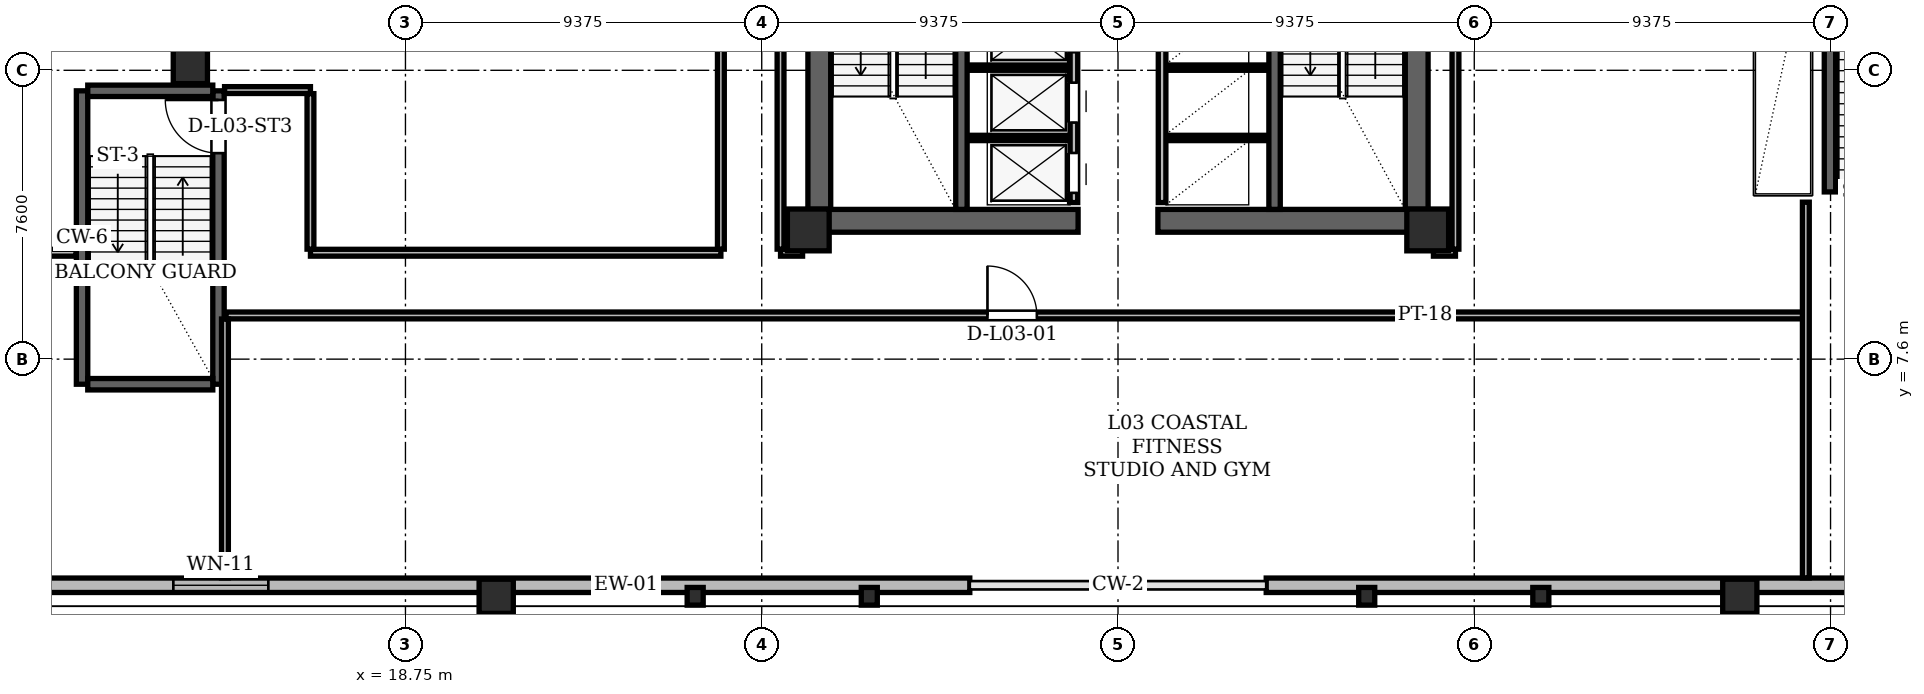
"""IFC4 building model, lengths in metres.
Left out: names, types, materials, properties, quantities, classifications, styles, units other than length and angle.
Written with IfcOpenShell. Run it as: python <this file> out.ifc"""

import sys

from ifc_helpers import new_model, si_unit, direction, frame, frame_2d, origin, origin_2d, place, context, subcontext, project, spatial, rectangle, hollow_rectangle, i_section, extrude, element, fill, save


model = new_model("IFC4")
c1 = context("Model", 3, precision=1e-05, world=origin(), true_north=direction((0.0, 1.0)))
c2 = subcontext(c1, "Body", "Model", "MODEL_VIEW")
j1 = project(units=[si_unit("LENGTHUNIT", "METRE"), si_unit("PLANEANGLEUNIT", "RADIAN")], contexts=[c1])
p1 = place(None, origin())
s1 = spatial("IfcSite", under=j1, at=p1, CompositionType="ELEMENT")
p2 = place(p1, origin())
s2 = spatial("IfcBuilding", under=s1, at=p2, CompositionType="ELEMENT")
p3 = place(p2, frame((0.0, 0.0, 14.1)))
s3 = spatial("IfcBuildingStorey", under=s2, at=p3, CompositionType="ELEMENT", Elevation=14.1)
for number, where, z_axis, x_axis in (
    (1, (29.35, 11.0, 0.0), (0.0, 0.0, 1.0), (1.0, 0.0, 0.0)),
    (2, (45.65, 11.0, 0.0), (0.0, 0.0, 1.0), (1.0, 0.0, 0.0)),
):
    element("IfcColumn", number, at=place(p3, frame(where, z_axis=z_axis, x_axis=x_axis)), inside=s3, PredefinedType="COLUMN", context=c2, shape_type="SweptSolid", body=[
        extrude(hollow_rectangle(XDim=1.1, YDim=1.1, WallThickness=0.09, at=origin_2d()), origin(), (0.0, 0.0, 1.0), 4.2),
    ])
for number, where, z_axis, x_axis in (
    (3, (13.09, 15.3, 0.004), (0.0, 0.0, 1.0), (1.0, 0.0, 0.0)),
    (4, (21.138, 1.36, 0.004), (0.0, 0.0, 1.0), (1.0, 0.0, 0.0)),
    (5, (53.862, 1.36, 0.004), (0.0, 0.0, 1.0), (1.0, 0.0, 0.0)),
):
    element("IfcColumn", number, at=place(p3, frame(where, z_axis=z_axis, x_axis=x_axis)), inside=s3, PredefinedType="COLUMN", context=c2, shape_type="SweptSolid", body=[
        extrude(hollow_rectangle(XDim=0.9, YDim=0.9, WallThickness=0.075, at=origin_2d()), origin(), (0.0, 0.0, 1.0), 4.191),
    ])
for number, where, z_axis, x_axis in (
    (6, (26.374, 1.36, 0.004), (0.0, 0.0, 1.0), (1.0, 0.0, 0.0)),
    (7, (30.955, 1.36, 0.004), (0.0, 0.0, 1.0), (1.0, 0.0, 0.0)),
    (8, (44.045, 1.36, 0.004), (0.0, 0.0, 1.0), (1.0, 0.0, 0.0)),
    (9, (48.626, 1.36, 0.004), (0.0, 0.0, 1.0), (1.0, 0.0, 0.0)),
):
    element("IfcColumn", number, at=place(p3, frame(where, z_axis=z_axis, x_axis=x_axis)), inside=s3, PredefinedType="COLUMN", context=c2, shape_type="SweptSolid", body=[
        extrude(i_section(OverallWidth=0.422, OverallDepth=0.465, WebThickness=0.045, FlangeThickness=0.072, at=origin_2d()), origin(), (0.0, 0.0, 1.0), 4.191),
    ])
for number, where, z_axis, x_axis in (
    (10, (29.64, 11.0, 0.0), (0.0, 0.0, 1.0), (0.0, 1.0, 0.0)),
    (11, (45.36, 11.0, 0.0), (0.0, 0.0, 1.0), (0.0, 1.0, 0.0)),
):
    element("IfcWall", number, at=place(p3, frame(where, z_axis=z_axis, x_axis=x_axis)), inside=s3, PredefinedType="SHEAR", context=c2, shape_type="SweptSolid", body=[
        extrude(rectangle(XDim=13.3, YDim=0.6, at=frame_2d((6.65, 0.0))), origin(), (0.0, 0.0, 1.0), 3.92),
    ])
for number, where, z_axis, x_axis in (
    (12, (29.35, 11.24, 0.0), (0.0, 0.0, 1.0), (1.0, 0.0, 0.0)),
    (13, (38.55, 11.24, 0.0), (0.0, 0.0, 1.0), (1.0, 0.0, 0.0)),
):
    element("IfcWall", number, at=place(p3, frame(where, z_axis=z_axis, x_axis=x_axis)), inside=s3, PredefinedType="SHEAR", context=c2, shape_type="SweptSolid", body=[
        extrude(rectangle(XDim=7.1, YDim=0.6, at=frame_2d((3.55, 0.0))), origin(), (0.0, 0.0, 1.0), 3.92),
    ])
for number, where, z_axis, x_axis in (
    (14, (33.38, 11.54, 0.0), (0.0, 0.0, 1.0), (0.0, 1.0, 0.0)),
    (15, (41.62, 11.54, 0.0), (0.0, 0.0, 1.0), (0.0, 1.0, 0.0)),
):
    element("IfcWall", number, at=place(p3, frame(where, z_axis=z_axis, x_axis=x_axis)), inside=s3, PredefinedType="SHEAR", context=c2, shape_type="SweptSolid", body=[
        extrude(rectangle(XDim=7.62, YDim=0.3, at=frame_2d((3.81, 0.0))), origin(), (0.0, 0.0, 1.0), 3.92),
    ])
p4 = place(p3, frame((10.24, 6.94, 0.0), z_axis=(0.0, 0.0, 1.0), x_axis=(0.0, 1.0, 0.0)))
e16 = element("IfcWall", 16, at=p4, inside=s3, PredefinedType="SHEAR", context=c2, shape_type="SweptSolid", body=[
    extrude(rectangle(XDim=7.72, YDim=0.3, at=frame_2d((3.86, 0.0))), origin(), (0.0, 0.0, 1.0), 3.92),
])
p5 = place(p3, frame((13.83, 6.94, 0.0), z_axis=(0.0, 0.0, 1.0), x_axis=(0.0, 1.0, 0.0)))
e17 = element("IfcWall", 17, at=p5, inside=s3, PredefinedType="SHEAR", context=c2, shape_type="SweptSolid", body=[
    extrude(rectangle(XDim=7.72, YDim=0.3, at=frame_2d((3.86, 0.0))), origin(), (0.0, 0.0, 1.0), 3.92),
])
p6 = place(p5, frame((6.08, 0.0, 0.0)))
e18 = element("IfcOpeningElement", 18, at=p6, cuts=e17, PredefinedType="OPENING", context=c2, shape_type="SweptSolid", body=[
    extrude(rectangle(XDim=1.4, YDim=2.2, at=frame_2d((0.7, 1.1))), frame((0.0, 0.15, 0.0), z_axis=(0.0, -1.0, 0.0), x_axis=(1.0, 0.0, 0.0)), (0.0, 0.0, 1.0), 0.3),
])
for number, where, z_axis, x_axis in (
    (19, (10.39, 6.94, 0.0), (0.0, 0.0, 1.0), (1.0, 0.0, 0.0)),
    (20, (10.39, 14.66, 0.0), (0.0, 0.0, 1.0), (1.0, 0.0, 0.0)),
):
    element("IfcWall", number, at=place(p3, frame(where, z_axis=z_axis, x_axis=x_axis)), inside=s3, PredefinedType="SHEAR", context=c2, shape_type="SweptSolid", body=[
        extrude(rectangle(XDim=3.29, YDim=0.3, at=frame_2d((1.645, 0.0))), origin(), (0.0, 0.0, 1.0), 3.92),
    ])
p7 = place(p3, frame((56.235, 12.0, 0.0), z_axis=(0.0, 0.0, 1.0), x_axis=(0.0, 1.0, 0.0)))
e21 = element("IfcWall", 21, at=p7, inside=s3, PredefinedType="SHEAR", context=c2, shape_type="SweptSolid", body=[
    extrude(rectangle(XDim=6.67, YDim=0.3, at=frame_2d((3.335, 0.0))), origin(), (0.0, 0.0, 1.0), 3.92),
])
p8 = place(p3, frame((6.228, 1.65, 0.0), z_axis=(0.0, 0.0, 1.0), x_axis=(1.0, 0.0, 0.0)))
e22 = element("IfcWall", 22, at=p8, inside=s3, PredefinedType="SOLIDWALL", context=c2, shape_type="SweptSolid", body=[
    extrude(rectangle(XDim=27.372, YDim=0.38, at=frame_2d((13.686, 0.0))), origin(), (0.0, 0.0, 1.0), 2.983),
])
p9 = place(p8, frame((6.414, 0.0, 0.85)))
e23 = element("IfcOpeningElement", 23, at=p9, cuts=e22, PredefinedType="OPENING", context=c2, shape_type="SweptSolid", body=[
    extrude(rectangle(XDim=2.5, YDim=1.963, at=frame_2d((1.25, 0.981))), frame((0.0, 0.19, 0.0), z_axis=(0.0, -1.0, 0.0), x_axis=(1.0, 0.0, 0.0)), (0.0, 0.0, 1.0), 0.38),
])
p10 = place(p3, frame((41.4, 1.65, 0.0), z_axis=(0.0, 0.0, 1.0), x_axis=(1.0, 0.0, 0.0)))
e24 = element("IfcWall", 24, at=p10, inside=s3, PredefinedType="SOLIDWALL", context=c2, shape_type="SweptSolid", body=[
    extrude(rectangle(XDim=27.372, YDim=0.38, at=frame_2d((13.686, 0.0))), origin(), (0.0, 0.0, 1.0), 2.983),
])
p11 = place(p10, frame((18.458, 0.0, 0.85)))
e25 = element("IfcOpeningElement", 25, at=p11, cuts=e24, PredefinedType="OPENING", context=c2, shape_type="SweptSolid", body=[
    extrude(rectangle(XDim=2.5, YDim=1.963, at=frame_2d((1.25, 0.981))), frame((0.0, 0.19, 0.0), z_axis=(0.0, -1.0, 0.0), x_axis=(1.0, 0.0, 0.0)), (0.0, 0.0, 1.0), 0.38),
])
p12 = place(p3, frame((36.34, 11.72, 0.0), z_axis=(0.0, 0.0, 1.0), x_axis=(0.0, 1.0, 0.0)))
e26 = element("IfcWall", 26, at=p12, inside=s3, PredefinedType="PARTITIONING", context=c2, shape_type="SweptSolid", body=[
    extrude(rectangle(XDim=7.6, YDim=0.2, at=frame_2d((3.8, 0.0))), origin(), (0.0, 0.0, 1.0), 3.92),
])
p13 = place(p12, frame((0.255, 0.0, 0.0)))
e27 = element("IfcOpeningElement", 27, at=p13, cuts=e26, PredefinedType="OPENING", context=c2, shape_type="SweptSolid", body=[
    extrude(rectangle(XDim=1.05, YDim=2.15, at=frame_2d((0.525, 1.075))), frame((0.0, 0.1, 0.0), z_axis=(0.0, -1.0, 0.0), x_axis=(1.0, 0.0, 0.0)), (0.0, 0.0, 1.0), 0.2),
])
p14 = place(p12, frame((2.105, 0.0, 0.0)))
e28 = element("IfcOpeningElement", 28, at=p14, cuts=e26, PredefinedType="OPENING", context=c2, shape_type="SweptSolid", body=[
    extrude(rectangle(XDim=1.05, YDim=2.15, at=frame_2d((0.525, 1.075))), frame((0.0, 0.1, 0.0), z_axis=(0.0, -1.0, 0.0), x_axis=(1.0, 0.0, 0.0)), (0.0, 0.0, 1.0), 0.2),
])
p15 = place(p12, frame((3.955, 0.0, 0.0)))
e29 = element("IfcOpeningElement", 29, at=p15, cuts=e26, PredefinedType="OPENING", context=c2, shape_type="SweptSolid", body=[
    extrude(rectangle(XDim=1.05, YDim=2.15, at=frame_2d((0.525, 1.075))), frame((0.0, 0.1, 0.0), z_axis=(0.0, -1.0, 0.0), x_axis=(1.0, 0.0, 0.0)), (0.0, 0.0, 1.0), 0.2),
])
for number, where, z_axis, x_axis in (
    (30, (33.56, 13.42, 0.0), (0.0, 0.0, 1.0), (1.0, 0.0, 0.0)),
    (31, (33.56, 15.27, 0.0), (0.0, 0.0, 1.0), (1.0, 0.0, 0.0)),
):
    element("IfcWall", number, at=place(p3, frame(where, z_axis=z_axis, x_axis=x_axis)), inside=s3, PredefinedType="PARTITIONING", context=c2, shape_type="SweptSolid", body=[
        extrude(rectangle(XDim=2.66, YDim=0.14, at=frame_2d((1.33, 0.0))), origin(), (0.0, 0.0, 1.0), 3.92),
    ])
p16 = place(p3, frame((38.66, 11.72, 0.0), z_axis=(0.0, 0.0, 1.0), x_axis=(0.0, 1.0, 0.0)))
e32 = element("IfcWall", 32, at=p16, inside=s3, PredefinedType="PARTITIONING", context=c2, shape_type="SweptSolid", body=[
    extrude(rectangle(XDim=9.1, YDim=0.2, at=frame_2d((4.55, 0.0))), origin(), (0.0, 0.0, 1.0), 3.92),
])
for number, where, z_axis, x_axis in (
    (33, (38.78, 13.42, 0.0), (0.0, 0.0, 1.0), (1.0, 0.0, 0.0)),
    (34, (38.78, 15.27, 0.0), (0.0, 0.0, 1.0), (1.0, 0.0, 0.0)),
):
    element("IfcWall", number, at=place(p3, frame(where, z_axis=z_axis, x_axis=x_axis)), inside=s3, PredefinedType="PARTITIONING", context=c2, shape_type="SweptSolid", body=[
        extrude(rectangle(XDim=2.66, YDim=0.14, at=frame_2d((1.33, 0.0))), origin(), (0.0, 0.0, 1.0), 3.92),
    ])
p17 = place(p3, frame((14.03, 8.75, 0.0), z_axis=(0.0, 0.0, 1.0), x_axis=(1.0, 0.0, 0.0)))
e35 = element("IfcWall", 35, at=p17, inside=s3, PredefinedType="PARTITIONING", context=c2, shape_type="SweptSolid", body=[
    extrude(rectangle(XDim=41.57, YDim=0.18, at=frame_2d((20.785, 0.0))), origin(), (0.0, 0.0, 1.0), 2.983),
])
p18 = place(p17, frame((20.035, 0.0, 0.0)))
e36 = element("IfcOpeningElement", 36, at=p18, cuts=e35, PredefinedType="OPENING", context=c2, shape_type="SweptSolid", body=[
    extrude(rectangle(XDim=1.3, YDim=2.2, at=frame_2d((0.65, 1.1))), frame((0.0, 0.09, 0.0), z_axis=(0.0, -1.0, 0.0), x_axis=(1.0, 0.0, 0.0)), (0.0, 0.0, 1.0), 0.18),
])
p19 = place(p3, frame((4.144, 10.4, 0.0), z_axis=(0.0, 0.0, 1.0), x_axis=(1.0, 0.0, 0.0)))
e37 = element("IfcWall", 37, at=p19, inside=s3, PredefinedType="PARTITIONING", context=c2, shape_type="SweptSolid", body=[
    extrude(rectangle(XDim=5.936, YDim=0.18, at=frame_2d((2.968, 0.0))), origin(), (0.0, 0.0, 1.0), 2.53),
])
p20 = place(p3, frame((16.25, 10.4, 0.0), z_axis=(0.0, 0.0, 1.0), x_axis=(1.0, 0.0, 0.0)))
e38 = element("IfcWall", 38, at=p20, inside=s3, PredefinedType="PARTITIONING", context=c2, shape_type="SweptSolid", body=[
    extrude(rectangle(XDim=10.8, YDim=0.18, at=frame_2d((5.4, 0.0))), origin(), (0.0, 0.0, 1.0), 3.92),
])
for number, where, z_axis, x_axis in (
    (39, (28.62, 10.4, 0.0), (0.0, 0.0, 1.0), (1.0, 0.0, 0.0)),
    (40, (45.8, 10.4, 0.0), (0.0, 0.0, 1.0), (1.0, 0.0, 0.0)),
):
    element("IfcWall", number, at=place(p3, frame(where, z_axis=z_axis, x_axis=x_axis)), inside=s3, PredefinedType="PARTITIONING", context=c2, shape_type="SweptSolid", body=[
        extrude(rectangle(XDim=0.58, YDim=0.18, at=frame_2d((0.29, 0.0))), origin(), (0.0, 0.0, 1.0), 2.983),
    ])
p21 = place(p3, frame((13.99, 14.68, 0.0), z_axis=(0.0, 0.0, 1.0), x_axis=(1.0, 0.0, 0.0)))
e41 = element("IfcWall", 41, at=p21, inside=s3, PredefinedType="PARTITIONING", context=c2, shape_type="SweptSolid", body=[
    extrude(rectangle(XDim=2.26, YDim=0.18, at=frame_2d((1.13, 0.0))), origin(), (0.0, 0.0, 1.0), 2.983),
])
p22 = place(p3, frame((14.0, 1.844, 0.0), z_axis=(0.0, 0.0, 1.0), x_axis=(0.0, 1.0, 0.0)))
e42 = element("IfcWall", 42, at=p22, inside=s3, PredefinedType="PARTITIONING", context=c2, shape_type="SweptSolid", body=[
    extrude(rectangle(XDim=6.812, YDim=0.18, at=frame_2d((3.406, 0.0))), origin(), (0.0, 0.0, 1.0), 3.92),
])
p23 = place(p3, frame((16.25, 10.494, 0.0), z_axis=(0.0, 0.0, 1.0), x_axis=(0.0, 1.0, 0.0)))
e43 = element("IfcWall", 43, at=p23, inside=s3, PredefinedType="PARTITIONING", context=c2, shape_type="SweptSolid", body=[
    extrude(rectangle(XDim=4.092, YDim=0.18, at=frame_2d((2.046, 0.0))), origin(), (0.0, 0.0, 1.0), 2.983),
])
p24 = place(p3, frame((27.05, 10.494, 0.0), z_axis=(0.0, 0.0, 1.0), x_axis=(0.0, 1.0, 0.0)))
e44 = element("IfcWall", 44, at=p24, inside=s3, PredefinedType="PARTITIONING", context=c2, shape_type="SweptSolid", body=[
    extrude(rectangle(XDim=28.386, YDim=0.18, at=frame_2d((14.193, 0.0))), origin(), (0.0, 0.0, 1.0), 2.983),
])
p25 = place(p24, frame((5.985, 0.0, 0.0)))
e45 = element("IfcOpeningElement", 45, at=p25, cuts=e44, PredefinedType="OPENING", context=c2, shape_type="SweptSolid", body=[
    extrude(rectangle(XDim=1.3, YDim=2.2, at=frame_2d((0.65, 1.1))), frame((0.0, 0.09, 0.0), z_axis=(0.0, -1.0, 0.0), x_axis=(1.0, 0.0, 0.0)), (0.0, 0.0, 1.0), 0.18),
])
p26 = place(p3, frame((28.62, 10.494, 0.0), z_axis=(0.0, 0.0, 1.0), x_axis=(0.0, 1.0, 0.0)))
e46 = element("IfcWall", 46, at=p26, inside=s3, PredefinedType="PARTITIONING", context=c2, shape_type="SweptSolid", body=[
    extrude(rectangle(XDim=14.162, YDim=0.18, at=frame_2d((7.081, 0.0))), origin(), (0.0, 0.0, 1.0), 2.983),
])
p27 = place(p3, frame((46.38, 10.494, 0.0), z_axis=(0.0, 0.0, 1.0), x_axis=(0.0, 1.0, 0.0)))
e47 = element("IfcWall", 47, at=p27, inside=s3, PredefinedType="PARTITIONING", context=c2, shape_type="SweptSolid", body=[
    extrude(rectangle(XDim=14.162, YDim=0.18, at=frame_2d((7.081, 0.0))), origin(), (0.0, 0.0, 1.0), 3.92),
])
p28 = place(p3, frame((55.6, 1.844, 0.0), z_axis=(0.0, 0.0, 1.0), x_axis=(0.0, 1.0, 0.0)))
e48 = element("IfcWall", 48, at=p28, inside=s3, PredefinedType="PARTITIONING", context=c2, shape_type="SweptSolid", body=[
    extrude(rectangle(XDim=9.886, YDim=0.18, at=frame_2d((4.943, 0.0))), origin(), (0.0, 0.0, 1.0), 3.054),
])
p29 = place(p9, origin())
e49 = element("IfcWindow", 49, at=p29, inside=s3, PartitioningType="SINGLE_PANEL", PredefinedType="WINDOW", context=c2, shape_type="SweptSolid", body=[
    extrude(rectangle(XDim=2.5, YDim=1.963, at=frame_2d((1.25, 0.981))), frame((0.0, 0.03, 0.0), z_axis=(0.0, -1.0, 0.0), x_axis=(1.0, 0.0, 0.0)), (0.0, 0.0, 1.0), 0.06),
])
fill(e23, e49)
p30 = place(p13, origin())
e50 = element("IfcDoor", 50, at=p30, inside=s3, OperationType="SLIDING_TO_LEFT", PredefinedType="DOOR", context=c2, shape_type="SweptSolid", body=[
    extrude(rectangle(XDim=1.05, YDim=2.15, at=frame_2d((0.525, 1.075))), frame((0.0, 0.025, 0.0), z_axis=(0.0, -1.0, 0.0), x_axis=(1.0, 0.0, 0.0)), (0.0, 0.0, 1.0), 0.05),
])
fill(e27, e50)
p31 = place(p14, origin())
e51 = element("IfcDoor", 51, at=p31, inside=s3, OperationType="SLIDING_TO_RIGHT", PredefinedType="DOOR", context=c2, shape_type="SweptSolid", body=[
    extrude(rectangle(XDim=1.05, YDim=2.15, at=frame_2d((0.525, 1.075))), frame((0.0, 0.025, 0.0), z_axis=(0.0, -1.0, 0.0), x_axis=(1.0, 0.0, 0.0)), (0.0, 0.0, 1.0), 0.05),
])
fill(e28, e51)
p32 = place(p15, origin())
e52 = element("IfcDoor", 52, at=p32, inside=s3, OperationType="SLIDING_TO_LEFT", PredefinedType="DOOR", context=c2, shape_type="SweptSolid", body=[
    extrude(rectangle(XDim=1.05, YDim=2.15, at=frame_2d((0.525, 1.075))), frame((0.0, 0.025, 0.0), z_axis=(0.0, -1.0, 0.0), x_axis=(1.0, 0.0, 0.0)), (0.0, 0.0, 1.0), 0.05),
])
fill(e29, e52)
p33 = place(p6, origin())
e53 = element("IfcDoor", 53, at=p33, inside=s3, OperationType="SINGLE_SWING_RIGHT", PredefinedType="DOOR", context=c2, shape_type="SweptSolid", body=[
    extrude(rectangle(XDim=1.4, YDim=2.2, at=frame_2d((0.7, 1.1))), frame((0.0, 0.025, 0.0), z_axis=(0.0, -1.0, 0.0), x_axis=(1.0, 0.0, 0.0)), (0.0, 0.0, 1.0), 0.05),
])
fill(e18, e53)
p34 = place(p18, origin())
e54 = element("IfcDoor", 54, at=p34, inside=s3, OperationType="SINGLE_SWING_LEFT", PredefinedType="DOOR", context=c2, shape_type="SweptSolid", body=[
    extrude(rectangle(XDim=1.3, YDim=2.2, at=frame_2d((0.65, 1.1))), frame((0.0, 0.025, 0.0), z_axis=(0.0, -1.0, 0.0), x_axis=(1.0, 0.0, 0.0)), (0.0, 0.0, 1.0), 0.05),
])
fill(e36, e54)
save(model, sys.argv[1])
